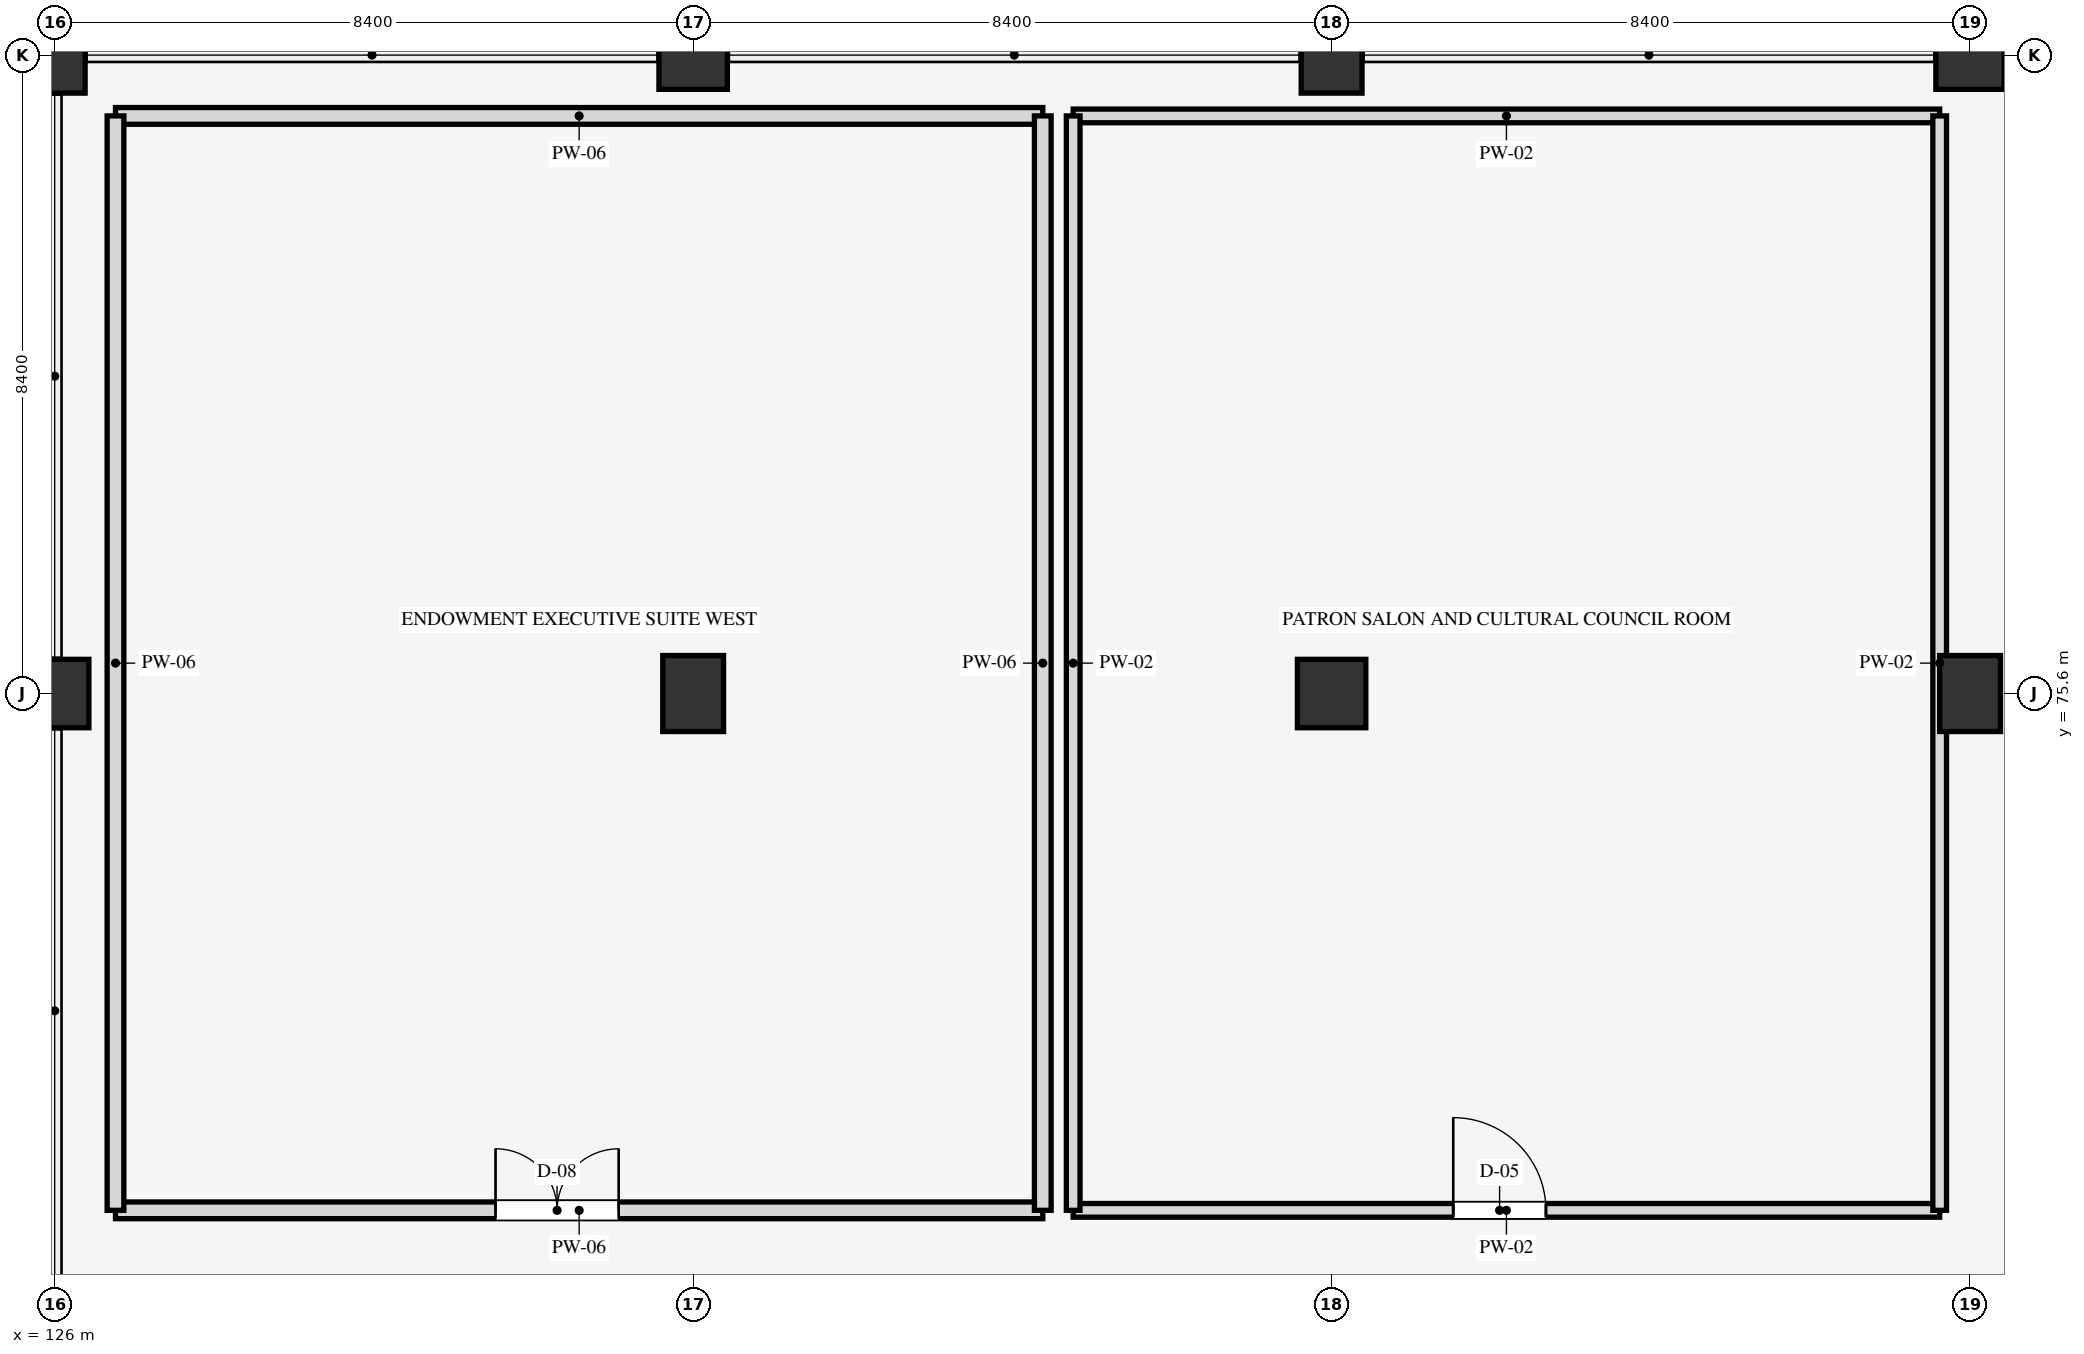
"""IFC4 building model, lengths in metres.
Left out: names, types, materials, properties, quantities, classifications, styles, units other than length and angle.
Written with IfcOpenShell. Run it as: python <this file> out.ifc"""

import sys

from ifc_helpers import new_model, si_unit, direction, frame, frame_2d, origin, origin_2d, place, context, subcontext, project, spatial, rectangle, extrude, element, fill, save


model = new_model("IFC4")
c1 = context("Model", 3, precision=1e-05, world=origin(), true_north=direction((0.0, 1.0)))
c2 = subcontext(c1, "Body", "Model", "MODEL_VIEW")
j1 = project(units=[si_unit("LENGTHUNIT", "METRE"), si_unit("PLANEANGLEUNIT", "RADIAN")], contexts=[c1])
p1 = place(None, origin())
s1 = spatial("IfcSite", under=j1, at=p1, CompositionType="ELEMENT")
p2 = place(p1, origin())
s2 = spatial("IfcBuilding", under=s1, at=p2, CompositionType="ELEMENT")
p3 = place(p2, frame((0.0, 0.0, 65.7)))
s3 = spatial("IfcBuildingStorey", under=s2, at=p3, CompositionType="ELEMENT", Elevation=65.7)
p4 = place(p3, frame((126.0, 75.6, 0.0), z_axis=(0.0, 0.0, 1.0), x_axis=(1.0, 0.0, 0.0)))
e1 = element("IfcColumn", 1, at=p4, inside=s3, PredefinedType="COLUMN", context=c2, shape_type="SweptSolid", body=[
    extrude(rectangle(XDim=0.9, YDim=0.9, at=origin_2d()), origin(), (0.0, 0.0, 1.0), 4.2),
])
for number, where, z_axis, x_axis in (
    (2, (126.0, 84.0, 0.0), (0.0, 0.0, 1.0), (1.0, 0.0, 0.0)),
    (3, (134.4, 75.6, 0.0), (0.0, 0.0, 1.0), (1.0, 0.0, 0.0)),
):
    element("IfcColumn", number, at=place(p3, frame(where, z_axis=z_axis, x_axis=x_axis)), inside=s3, PredefinedType="COLUMN", context=c2, shape_type="SweptSolid", body=[
        extrude(rectangle(XDim=0.8, YDim=1.0, at=origin_2d()), origin(), (0.0, 0.0, 1.0), 4.2),
    ])
for number, where, z_axis, x_axis in (
    (4, (134.4, 84.0, 0.0), (0.0, 0.0, 1.0), (1.0, 0.0, 0.0)),
    (5, (142.8, 75.6, 0.0), (0.0, 0.0, 1.0), (1.0, 0.0, 0.0)),
):
    element("IfcColumn", number, at=place(p3, frame(where, z_axis=z_axis, x_axis=x_axis)), inside=s3, PredefinedType="COLUMN", context=c2, shape_type="SweptSolid", body=[
        extrude(rectangle(XDim=0.9, YDim=0.9, at=origin_2d()), origin(), (0.0, 0.0, 1.0), 4.2),
    ])
for number, where, z_axis, x_axis in (
    (6, (142.8, 84.0, 0.0), (0.0, 0.0, 1.0), (1.0, 0.0, 0.0)),
    (7, (151.2, 75.6, 0.0), (0.0, 0.0, 1.0), (1.0, 0.0, 0.0)),
):
    element("IfcColumn", number, at=place(p3, frame(where, z_axis=z_axis, x_axis=x_axis)), inside=s3, PredefinedType="COLUMN", context=c2, shape_type="SweptSolid", body=[
        extrude(rectangle(XDim=0.8, YDim=1.0, at=origin_2d()), origin(), (0.0, 0.0, 1.0), 4.2),
    ])
p5 = place(p3, frame((151.2, 84.0, 0.0), z_axis=(0.0, 0.0, 1.0), x_axis=(1.0, 0.0, 0.0)))
e8 = element("IfcColumn", 8, at=p5, inside=s3, PredefinedType="COLUMN", context=c2, shape_type="SweptSolid", body=[
    extrude(rectangle(XDim=0.9, YDim=0.9, at=origin_2d()), origin(), (0.0, 0.0, 1.0), 4.2),
])
p6 = place(p3, frame((126.8, 68.8, 0.0), z_axis=(0.0, 0.0, 1.0), x_axis=(1.0, 0.0, 0.0)))
e9 = element("IfcWall", 9, at=p6, inside=s3, PredefinedType="PARTITIONING", context=c2, shape_type="SweptSolid", body=[
    extrude(rectangle(XDim=12.2, YDim=0.22, at=frame_2d((6.1, 0.0))), origin(), (0.0, 0.0, 1.0), 3.24),
])
p7 = place(p6, frame((5.0, 0.0, 0.0)))
e10 = element("IfcOpeningElement", 10, at=p7, cuts=e9, PredefinedType="OPENING", context=c2, shape_type="SweptSolid", body=[
    extrude(rectangle(XDim=1.62, YDim=2.22, at=frame_2d((0.81, 1.11))), frame((0.0, 0.12, 0.0), z_axis=(0.0, -1.0, 0.0), x_axis=(1.0, 0.0, 0.0)), (0.0, 0.0, 1.0), 0.24),
])
p8 = place(p3, frame((126.8, 83.2, 0.0), z_axis=(0.0, 0.0, 1.0), x_axis=(1.0, 0.0, 0.0)))
e11 = element("IfcWall", 11, at=p8, inside=s3, PredefinedType="PARTITIONING", context=c2, shape_type="SweptSolid", body=[
    extrude(rectangle(XDim=12.2, YDim=0.22, at=frame_2d((6.1, 0.0))), origin(), (0.0, 0.0, 1.0), 3.24),
])
for number, where, z_axis, x_axis in (
    (12, (126.8, 68.8, 0.0), (0.0, 0.0, 1.0), (0.0, 1.0, 0.0)),
    (13, (139.0, 68.8, 0.0), (0.0, 0.0, 1.0), (0.0, 1.0, 0.0)),
):
    element("IfcWall", number, at=place(p3, frame(where, z_axis=z_axis, x_axis=x_axis)), inside=s3, PredefinedType="PARTITIONING", context=c2, shape_type="SweptSolid", body=[
        extrude(rectangle(XDim=14.4, YDim=0.22, at=frame_2d((7.2, 0.0))), origin(), (0.0, 0.0, 1.0), 3.24),
    ])
p9 = place(p3, frame((139.4, 68.8, 0.0), z_axis=(0.0, 0.0, 1.0), x_axis=(1.0, 0.0, 0.0)))
e14 = element("IfcWall", 14, at=p9, inside=s3, PredefinedType="PARTITIONING", context=c2, shape_type="SweptSolid", body=[
    extrude(rectangle(XDim=11.4, YDim=0.18, at=frame_2d((5.7, 0.0))), origin(), (0.0, 0.0, 1.0), 3.24),
])
p10 = place(p9, frame((5.0, 0.0, 0.0)))
e15 = element("IfcOpeningElement", 15, at=p10, cuts=e14, PredefinedType="OPENING", context=c2, shape_type="SweptSolid", body=[
    extrude(rectangle(XDim=1.22, YDim=2.15, at=frame_2d((0.61, 1.075))), frame((0.0, 0.1, 0.0), z_axis=(0.0, -1.0, 0.0), x_axis=(1.0, 0.0, 0.0)), (0.0, 0.0, 1.0), 0.2),
])
p11 = place(p3, frame((139.4, 83.2, 0.0), z_axis=(0.0, 0.0, 1.0), x_axis=(1.0, 0.0, 0.0)))
e16 = element("IfcWall", 16, at=p11, inside=s3, PredefinedType="PARTITIONING", context=c2, shape_type="SweptSolid", body=[
    extrude(rectangle(XDim=11.4, YDim=0.18, at=frame_2d((5.7, 0.0))), origin(), (0.0, 0.0, 1.0), 3.24),
])
for number, where, z_axis, x_axis in (
    (17, (139.4, 68.8, 0.0), (0.0, 0.0, 1.0), (0.0, 1.0, 0.0)),
    (18, (150.8, 68.8, 0.0), (0.0, 0.0, 1.0), (0.0, 1.0, 0.0)),
):
    element("IfcWall", number, at=place(p3, frame(where, z_axis=z_axis, x_axis=x_axis)), inside=s3, PredefinedType="PARTITIONING", context=c2, shape_type="SweptSolid", body=[
        extrude(rectangle(XDim=14.4, YDim=0.18, at=frame_2d((7.2, 0.0))), origin(), (0.0, 0.0, 1.0), 3.24),
    ])
p12 = place(p7, origin())
e19 = element("IfcDoor", 19, at=p12, inside=s3, OperationType="DOUBLE_DOOR_SINGLE_SWING", PredefinedType="DOOR", context=c2, shape_type="SweptSolid", body=[
    extrude(rectangle(XDim=1.62, YDim=2.22, at=frame_2d((0.81, 1.11))), frame((0.0, 0.025, 0.0), z_axis=(0.0, -1.0, 0.0), x_axis=(1.0, 0.0, 0.0)), (0.0, 0.0, 1.0), 0.05),
])
fill(e10, e19)
p13 = place(p10, origin())
e20 = element("IfcDoor", 20, at=p13, inside=s3, OperationType="SINGLE_SWING_LEFT", PredefinedType="DOOR", context=c2, shape_type="SweptSolid", body=[
    extrude(rectangle(XDim=1.22, YDim=2.15, at=frame_2d((0.61, 1.075))), frame((0.0, 0.025, 0.0), z_axis=(0.0, -1.0, 0.0), x_axis=(1.0, 0.0, 0.0)), (0.0, 0.0, 1.0), 0.05),
])
fill(e15, e20)
save(model, sys.argv[1])
